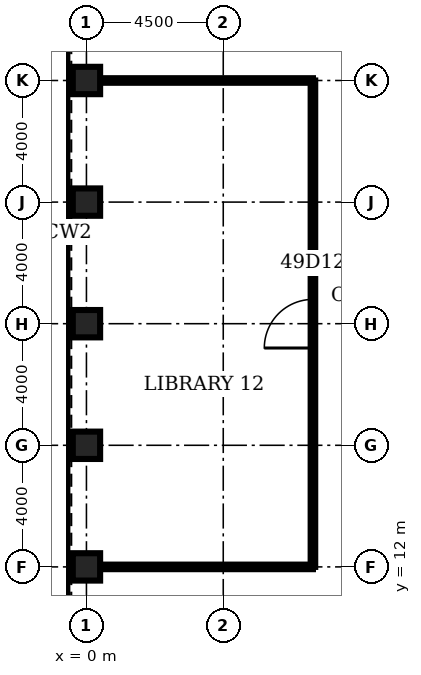
"""IFC4 building model, lengths in metres.
Left out: names, types, materials, properties, quantities, classifications, styles, units other than length and angle.
Written with IfcOpenShell. Run it as: python <this file> out.ifc"""

import sys

from ifc_helpers import new_model, si_unit, direction, frame, frame_2d, origin, origin_2d, place, context, subcontext, project, spatial, rectangle, hollow_rectangle, extrude, element, fill, save


model = new_model("IFC4")
c1 = context("Model", 3, precision=1e-05, world=origin(), true_north=direction((0.0, 1.0)))
c2 = subcontext(c1, "Body", "Model", "MODEL_VIEW")
j1 = project(units=[si_unit("LENGTHUNIT", "METRE"), si_unit("PLANEANGLEUNIT", "RADIAN")], contexts=[c1])
p1 = place(None, origin())
s1 = spatial("IfcSite", under=j1, at=p1, CompositionType="ELEMENT")
p2 = place(p1, origin())
s2 = spatial("IfcBuilding", under=s1, at=p2, CompositionType="ELEMENT")
p3 = place(p2, frame((0.0, 0.0, 219.4)))
s3 = spatial("IfcBuildingStorey", under=s2, at=p3, CompositionType="ELEMENT", Elevation=219.4)
for number, where, z_axis, x_axis in (
    (1, (0.0, 28.0, 0.0), (0.0, 0.0, 1.0), (1.0, 0.0, 0.0)),
    (2, (0.0, 24.0, 0.0), (0.0, 0.0, 1.0), (1.0, 0.0, 0.0)),
    (3, (0.0, 20.0, 0.0), (0.0, 0.0, 1.0), (1.0, 0.0, 0.0)),
    (4, (0.0, 16.0, 0.0), (0.0, 0.0, 1.0), (1.0, 0.0, 0.0)),
    (5, (0.0, 12.0, 0.0), (0.0, 0.0, 1.0), (1.0, 0.0, 0.0)),
):
    element("IfcColumn", number, at=place(p3, frame(where, z_axis=z_axis, x_axis=x_axis)), inside=s3, PredefinedType="COLUMN", context=c2, shape_type="SweptSolid", body=[
        extrude(hollow_rectangle(XDim=0.9, YDim=0.9, WallThickness=0.08, at=origin_2d()), origin(), (0.0, 0.0, 1.0), 4.2),
    ])
for number, where, z_axis, x_axis in (
    (6, (0.45, 12.0, 0.0), (0.0, 0.0, 1.0), (1.0, 0.0, 0.0)),
    (7, (0.45, 28.0, 0.0), (0.0, 0.0, 1.0), (1.0, 0.0, 0.0)),
):
    element("IfcWall", number, at=place(p3, frame(where, z_axis=z_axis, x_axis=x_axis)), inside=s3, PredefinedType="PARTITIONING", context=c2, shape_type="SweptSolid", body=[
        extrude(rectangle(XDim=7.0, YDim=0.15, at=frame_2d((3.5, 0.0))), origin(), (0.0, 0.0, 1.0), 3.0),
    ])
p4 = place(p3, frame((7.45, 12.0, 0.0), z_axis=(0.0, 0.0, 1.0), x_axis=(0.0, 1.0, 0.0)))
e8 = element("IfcWall", 8, at=p4, inside=s3, PredefinedType="PARTITIONING", context=c2, shape_type="SweptSolid", body=[
    extrude(rectangle(XDim=16.0, YDim=0.15, at=frame_2d((8.0, 0.0))), origin(), (0.0, 0.0, 1.0), 3.0),
])
p5 = place(p4, frame((7.2, 0.0, 0.0)))
e9 = element("IfcOpeningElement", 9, at=p5, cuts=e8, PredefinedType="OPENING", context=c2, shape_type="SweptSolid", body=[
    extrude(rectangle(XDim=1.6, YDim=2.1, at=frame_2d((0.8, 1.05))), frame((0.0, 0.085, 0.0), z_axis=(0.0, -1.0, 0.0), x_axis=(1.0, 0.0, 0.0)), (0.0, 0.0, 1.0), 0.17),
])
p6 = place(p5, origin())
e10 = element("IfcDoor", 10, at=p6, inside=s3, OperationType="SINGLE_SWING_LEFT", PredefinedType="DOOR", context=c2, shape_type="SweptSolid", body=[
    extrude(rectangle(XDim=1.6, YDim=2.1, at=frame_2d((0.8, 1.05))), frame((0.0, 0.025, 0.0), z_axis=(0.0, -1.0, 0.0), x_axis=(1.0, 0.0, 0.0)), (0.0, 0.0, 1.0), 0.05),
])
fill(e9, e10)
save(model, sys.argv[1])
